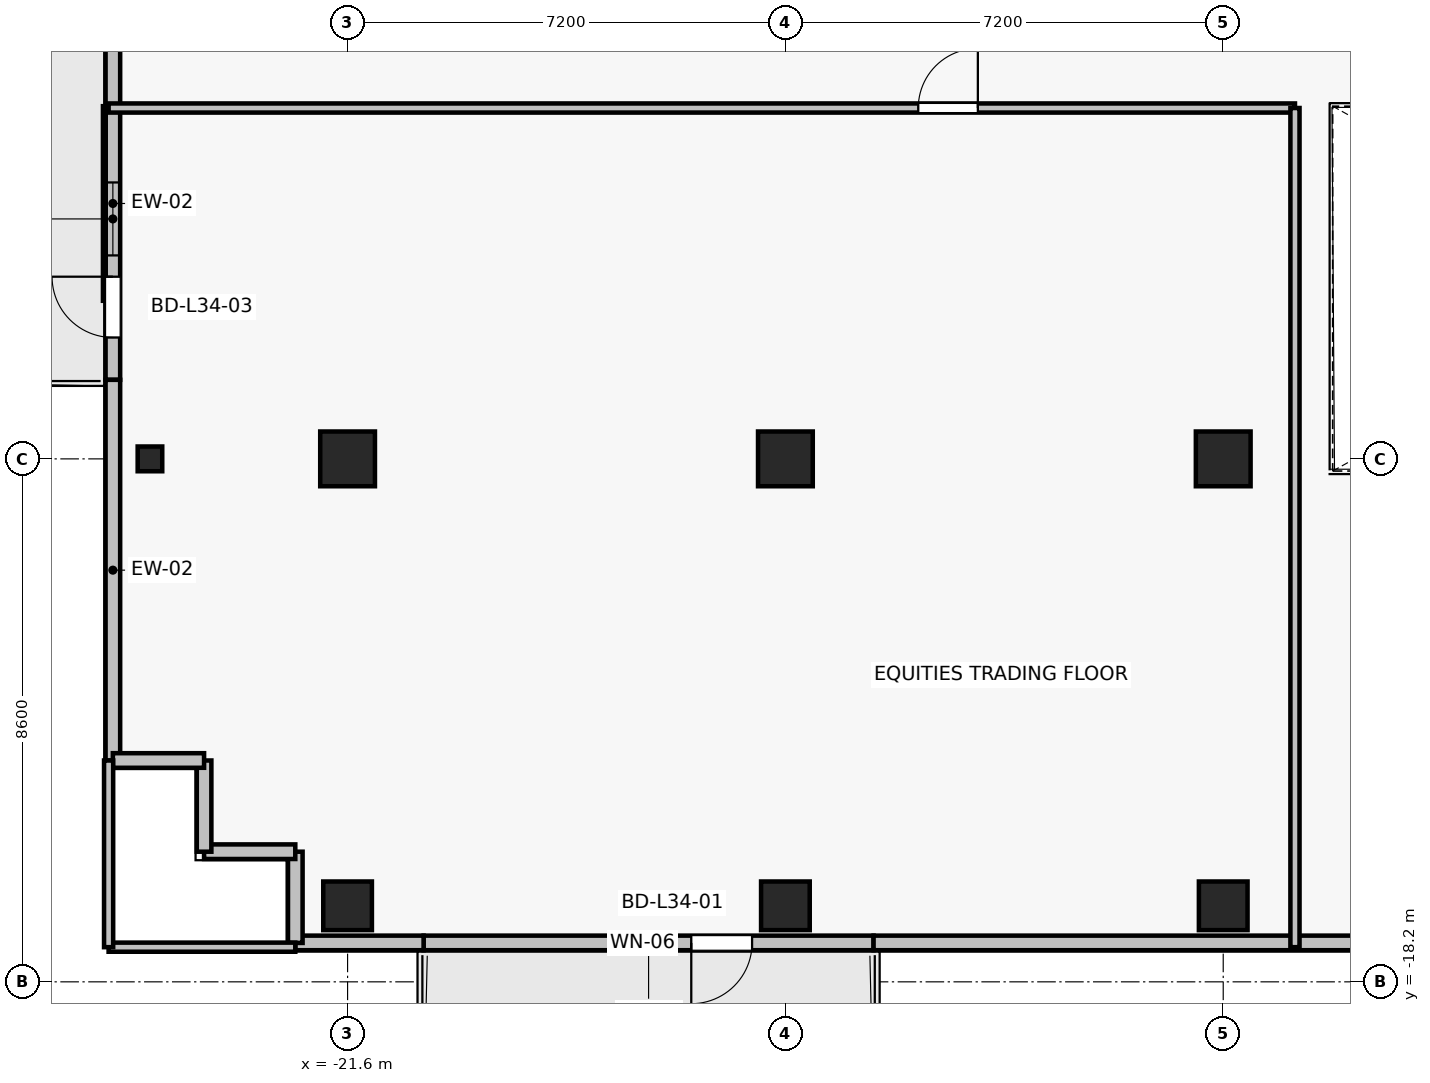
"""IFC4 building model, lengths in metres.
Left out: names, types, materials, properties, quantities, classifications, styles, units other than length and angle.
Written with IfcOpenShell. Run it as: python <this file> out.ifc"""

import sys

from ifc_helpers import new_model, si_unit, direction, frame, frame_2d, origin, origin_2d, place, context, subcontext, project, spatial, rectangle, i_section, extrude, source, transform, mapped, element, fill, save


model = new_model("IFC4")
c1 = context("Model", 3, precision=1e-05, world=origin(), true_north=direction((0.0, 1.0)))
c2 = subcontext(c1, "Body", "Model", "MODEL_VIEW")
j1 = project(units=[si_unit("LENGTHUNIT", "METRE"), si_unit("PLANEANGLEUNIT", "RADIAN")], contexts=[c1])
p1 = place(None, origin())
s1 = spatial("IfcSite", under=j1, at=p1, CompositionType="ELEMENT")
p2 = place(p1, origin())
s2 = spatial("IfcBuilding", under=s1, at=p2, CompositionType="ELEMENT")
p3 = place(p2, frame((0.0, 0.0, 123.1)))
s3 = spatial("IfcBuildingStorey", under=s2, at=p3, CompositionType="ELEMENT", Elevation=123.1)
for number, where, z_axis, x_axis in (
    (1, (-14.4, -9.6, 0.0), (0.0, 0.0, 1.0), (1.0, 0.0, 0.0)),
    (2, (-7.2, -9.6, 0.0), (0.0, 0.0, 1.0), (1.0, 0.0, 0.0)),
    (3, (-21.6, -9.6, 0.0), (0.0, 0.0, 1.0), (1.0, 0.0, 0.0)),
):
    element("IfcColumn", number, at=place(p3, frame(where, z_axis=z_axis, x_axis=x_axis)), inside=s3, PredefinedType="COLUMN", context=c2, shape_type="SweptSolid", body=[
        extrude(rectangle(XDim=0.9, YDim=0.9, at=origin_2d()), origin(), (0.0, 0.0, 1.0), 3.3),
    ])
for number, where, z_axis, x_axis in (
    (4, (-14.4, -16.95, 0.0), (0.0, 0.0, 1.0), (1.0, 0.0, 0.0)),
    (5, (-7.2, -16.95, 0.0), (0.0, 0.0, 1.0), (1.0, 0.0, 0.0)),
    (6, (-21.6, -16.95, 0.0), (0.0, 0.0, 1.0), (1.0, 0.0, 0.0)),
):
    element("IfcColumn", number, at=place(p3, frame(where, z_axis=z_axis, x_axis=x_axis)), inside=s3, PredefinedType="COLUMN", context=c2, shape_type="SweptSolid", body=[
        extrude(rectangle(XDim=0.8, YDim=0.8, at=origin_2d()), origin(), (0.0, 0.0, 1.0), 3.3),
    ])
p4 = place(p3, frame((-24.85, -9.6, 0.0), z_axis=(0.0, 0.0, 1.0), x_axis=(1.0, 0.0, 0.0)))
e7 = element("IfcColumn", 7, at=p4, inside=s3, PredefinedType="COLUMN", context=c2, shape_type="SweptSolid", body=[
    extrude(i_section(OverallWidth=0.404, OverallDepth=0.407, WebThickness=0.022, FlangeThickness=0.032, FilletRadius=0.015, at=origin_2d()), origin(), (0.0, 0.0, 1.0), 3.3),
])
p5 = place(p3, frame((-12.95, -17.56, 0.0), z_axis=(0.0, 0.0, 1.0), x_axis=(-1.0, 0.0, 0.0)))
e8 = element("IfcWall", 8, at=p5, inside=s3, PredefinedType="SOLIDWALL", context=c2, shape_type="SweptSolid", body=[
    extrude(rectangle(XDim=7.4, YDim=0.24, at=frame_2d((3.7, 0.0))), origin(), (0.0, 0.0, 1.0), 2.665),
])
p6 = place(p5, frame((1.998, 0.0, 0.0)))
e9 = element("IfcOpeningElement", 9, at=p6, cuts=e8, PredefinedType="OPENING", context=c2, shape_type="SweptSolid", body=[
    extrude(rectangle(XDim=1.0, YDim=2.2, at=frame_2d((0.5, 1.1))), frame((0.0, 0.13, 0.0), z_axis=(0.0, -1.0, 0.0), x_axis=(1.0, 0.0, 0.0)), (0.0, 0.0, 1.0), 0.26),
])
p7 = place(p5, frame((3.348, 0.0, 0.85)))
e10 = element("IfcOpeningElement", 10, at=p7, cuts=e8, PredefinedType="OPENING", context=c2, shape_type="SweptSolid", body=[
    extrude(rectangle(XDim=0.9, YDim=1.35, at=frame_2d((0.45, 0.675))), frame((0.0, 0.13, 0.0), z_axis=(0.0, -1.0, 0.0), x_axis=(1.0, 0.0, 0.0)), (0.0, 0.0, 1.0), 0.26),
])
p8 = place(p3, frame((-25.46, -8.3, 0.0), z_axis=(0.0, 0.0, 1.0), x_axis=(0.0, 1.0, 0.0)))
e11 = element("IfcWall", 11, at=p8, inside=s3, PredefinedType="SOLIDWALL", context=c2, shape_type="SweptSolid", body=[
    extrude(rectangle(XDim=5.8, YDim=0.24, at=frame_2d((2.9, 0.0))), origin(), (0.0, 0.0, 1.0), 3.075),
])
p9 = place(p8, frame((0.696, 0.0, 0.0)))
e12 = element("IfcOpeningElement", 12, at=p9, cuts=e11, PredefinedType="OPENING", context=c2, shape_type="SweptSolid", body=[
    extrude(rectangle(XDim=1.0, YDim=2.2, at=frame_2d((0.5, 1.1))), frame((0.0, 0.13, 0.0), z_axis=(0.0, -1.0, 0.0), x_axis=(1.0, 0.0, 0.0)), (0.0, 0.0, 1.0), 0.26),
])
p10 = place(p8, frame((2.046, 0.0, 0.85)))
e13 = element("IfcOpeningElement", 13, at=p10, cuts=e11, PredefinedType="OPENING", context=c2, shape_type="SweptSolid", body=[
    extrude(rectangle(XDim=1.2, YDim=1.5, at=frame_2d((0.6, 0.75))), frame((0.0, 0.13, 0.0), z_axis=(0.0, -1.0, 0.0), x_axis=(1.0, 0.0, 0.0)), (0.0, 0.0, 1.0), 0.26),
])
p11 = place(p3, frame((-25.46, -8.3, 0.0), z_axis=(0.0, 0.0, 1.0), x_axis=(0.0, -1.0, 0.0)))
e14 = element("IfcWall", 14, at=p11, inside=s3, PredefinedType="SOLIDWALL", context=c2, shape_type="SweptSolid", body=[
    extrude(rectangle(XDim=6.26, YDim=0.24, at=frame_2d((3.13, 0.0))), origin(), (0.0, 0.0, 1.0), 3.075),
])
p12 = place(p3, frame((-12.95, -17.56, 0.0), z_axis=(0.0, 0.0, 1.0), x_axis=(1.0, 0.0, 0.0)))
e15 = element("IfcWall", 15, at=p12, inside=s3, PredefinedType="SOLIDWALL", context=c2, shape_type="SweptSolid", body=[
    extrude(rectangle(XDim=9.61, YDim=0.24, at=frame_2d((4.805, 0.0))), origin(), (0.0, 0.0, 1.0), 2.665),
])
p13 = place(p3, frame((-22.46, -17.56, 0.0), z_axis=(0.0, 0.0, 1.0), x_axis=(1.0, 0.0, 0.0)))
e16 = element("IfcWall", 16, at=p13, inside=s3, PredefinedType="SOLIDWALL", context=c2, shape_type="SweptSolid", body=[
    extrude(rectangle(XDim=2.11, YDim=0.24, at=frame_2d((1.055, 0.0))), origin(), (0.0, 0.0, 1.0), 3.075),
])
p14 = place(p3, frame((-22.46, -16.06, 0.0), z_axis=(0.0, 0.0, 1.0), x_axis=(0.0, -1.0, 0.0)))
e17 = element("IfcWall", 17, at=p14, inside=s3, PredefinedType="SOLIDWALL", context=c2, shape_type="SweptSolid", body=[
    extrude(rectangle(XDim=1.5, YDim=0.24, at=frame_2d((0.75, 0.0))), origin(), (0.0, 0.0, 1.0), 2.565),
])
for number, where, z_axis, x_axis in (
    (18, (-23.96, -16.06, 0.0), (0.0, 0.0, 1.0), (1.0, 0.0, 0.0)),
    (19, (-23.96, -14.56, 0.0), (0.0, 0.0, 1.0), (0.0, -1.0, 0.0)),
    (20, (-25.46, -14.56, 0.0), (0.0, 0.0, 1.0), (1.0, 0.0, 0.0)),
):
    element("IfcWall", number, at=place(p3, frame(where, z_axis=z_axis, x_axis=x_axis)), inside=s3, PredefinedType="SOLIDWALL", context=c2, shape_type="SweptSolid", body=[
        extrude(rectangle(XDim=1.5, YDim=0.24, at=frame_2d((0.75, 0.0))), origin(), (0.0, 0.0, 1.0), 3.075),
    ])
p15 = place(p3, frame((-22.46, -17.63, 0.0), z_axis=(0.0, 0.0, 1.0), x_axis=(-1.0, 0.0, 0.0)))
e21 = element("IfcWall", 21, at=p15, inside=s3, PredefinedType="PARTITIONING", context=c2, shape_type="SweptSolid", body=[
    extrude(rectangle(XDim=3.07, YDim=0.15, at=frame_2d((1.535, 0.0))), origin(), (0.0, 0.0, 1.0), 2.665),
])
p16 = place(p3, frame((-25.53, -3.83, 0.0), z_axis=(0.0, 0.0, 1.0), x_axis=(1.0, 0.0, 0.0)))
e22 = element("IfcWall", 22, at=p16, inside=s3, PredefinedType="PARTITIONING", context=c2, shape_type="SweptSolid", body=[
    extrude(rectangle(XDim=19.51, YDim=0.15, at=frame_2d((9.755, 0.0))), origin(), (0.0, 0.0, 1.0), 2.515),
])
p17 = place(p16, frame((13.315, 0.0, 0.0)))
e23 = element("IfcOpeningElement", 23, at=p17, cuts=e22, PredefinedType="OPENING", context=c2, shape_type="SweptSolid", body=[
    extrude(rectangle(XDim=0.98, YDim=2.15, at=frame_2d((0.49, 1.075))), frame((0.0, 0.085, 0.0), z_axis=(0.0, -1.0, 0.0), x_axis=(1.0, 0.0, 0.0)), (0.0, 0.0, 1.0), 0.17),
])
p18 = place(p3, frame((-25.53, -17.63, 0.0), z_axis=(0.0, 0.0, 1.0), x_axis=(0.0, 1.0, 0.0)))
e24 = element("IfcWall", 24, at=p18, inside=s3, PredefinedType="PARTITIONING", context=c2, shape_type="SweptSolid", body=[
    extrude(rectangle(XDim=3.07, YDim=0.15, at=frame_2d((1.535, 0.0))), origin(), (0.0, 0.0, 1.0), 3.075),
])
p19 = place(p3, frame((-6.02, -3.83, 0.0), z_axis=(0.0, 0.0, 1.0), x_axis=(0.0, -1.0, 0.0)))
e25 = element("IfcWall", 25, at=p19, inside=s3, PredefinedType="PARTITIONING", context=c2, shape_type="SweptSolid", body=[
    extrude(rectangle(XDim=13.8, YDim=0.15, at=frame_2d((6.9, 0.0))), origin(), (0.0, 0.0, 1.0), 2.515),
])
m1 = source(origin(), c2, "Body", "SweptSolid", [
    extrude(rectangle(XDim=1.0, YDim=2.2, at=frame_2d((0.5, 1.1))), frame((0.0, 0.025, 0.0), z_axis=(0.0, -1.0, 0.0), x_axis=(1.0, 0.0, 0.0)), (0.0, 0.0, 1.0), 0.05),
])
p20 = place(p6, origin())
e26 = element("IfcDoor", 26, at=p20, inside=s3, OperationType="SINGLE_SWING_RIGHT", PredefinedType="DOOR", context=c2, shape_type="MappedRepresentation", body=[
    mapped(m1, transform((0.0, 0.0, 0.0), x_axis=(1.0, 0.0, 0.0), y_axis=(0.0, 1.0, 0.0), z_axis=(0.0, 0.0, 1.0), scale=1.0)),
])
fill(e9, e26)
m2 = source(origin(), c2, "Body", "SweptSolid", [
    extrude(rectangle(XDim=0.9, YDim=1.35, at=frame_2d((0.45, 0.675))), frame((0.0, 0.03, 0.0), z_axis=(0.0, -1.0, 0.0), x_axis=(1.0, 0.0, 0.0)), (0.0, 0.0, 1.0), 0.06),
])
p21 = place(p7, origin())
e27 = element("IfcWindow", 27, at=p21, inside=s3, PartitioningType="SINGLE_PANEL", PredefinedType="WINDOW", context=c2, shape_type="MappedRepresentation", body=[
    mapped(m2, transform((0.0, 0.0, 0.0), x_axis=(1.0, 0.0, 0.0), y_axis=(0.0, 1.0, 0.0), z_axis=(0.0, 0.0, 1.0), scale=1.0)),
])
fill(e10, e27)
p22 = place(p9, origin())
e28 = element("IfcDoor", 28, at=p22, inside=s3, OperationType="SINGLE_SWING_RIGHT", PredefinedType="DOOR", context=c2, shape_type="MappedRepresentation", body=[
    mapped(m1, transform((0.0, 0.0, 0.0), x_axis=(1.0, 0.0, 0.0), y_axis=(0.0, 1.0, 0.0), z_axis=(0.0, 0.0, 1.0), scale=1.0)),
])
fill(e12, e28)
m3 = source(origin(), c2, "Body", "SweptSolid", [
    extrude(rectangle(XDim=1.2, YDim=1.5, at=frame_2d((0.6, 0.75))), frame((0.0, 0.03, 0.0), z_axis=(0.0, -1.0, 0.0), x_axis=(1.0, 0.0, 0.0)), (0.0, 0.0, 1.0), 0.06),
])
p23 = place(p10, origin())
e29 = element("IfcWindow", 29, at=p23, inside=s3, PartitioningType="SINGLE_PANEL", PredefinedType="WINDOW", context=c2, shape_type="MappedRepresentation", body=[
    mapped(m3, transform((0.0, 0.0, 0.0), x_axis=(1.0, 0.0, 0.0), y_axis=(0.0, 1.0, 0.0), z_axis=(0.0, 0.0, 1.0), scale=1.0)),
])
fill(e13, e29)
m4 = source(origin(), c2, "Body", "SweptSolid", [
    extrude(rectangle(XDim=0.98, YDim=2.15, at=frame_2d((0.49, 1.075))), frame((0.0, 0.025, 0.0), z_axis=(0.0, -1.0, 0.0), x_axis=(1.0, 0.0, 0.0)), (0.0, 0.0, 1.0), 0.05),
])
p24 = place(p17, origin())
e30 = element("IfcDoor", 30, at=p24, inside=s3, OperationType="SINGLE_SWING_RIGHT", PredefinedType="DOOR", context=c2, shape_type="MappedRepresentation", body=[
    mapped(m4, transform((0.0, 0.0, 0.0), x_axis=(1.0, 0.0, 0.0), y_axis=(0.0, 1.0, 0.0), z_axis=(0.0, 0.0, 1.0), scale=1.0)),
])
fill(e23, e30)
save(model, sys.argv[1])
